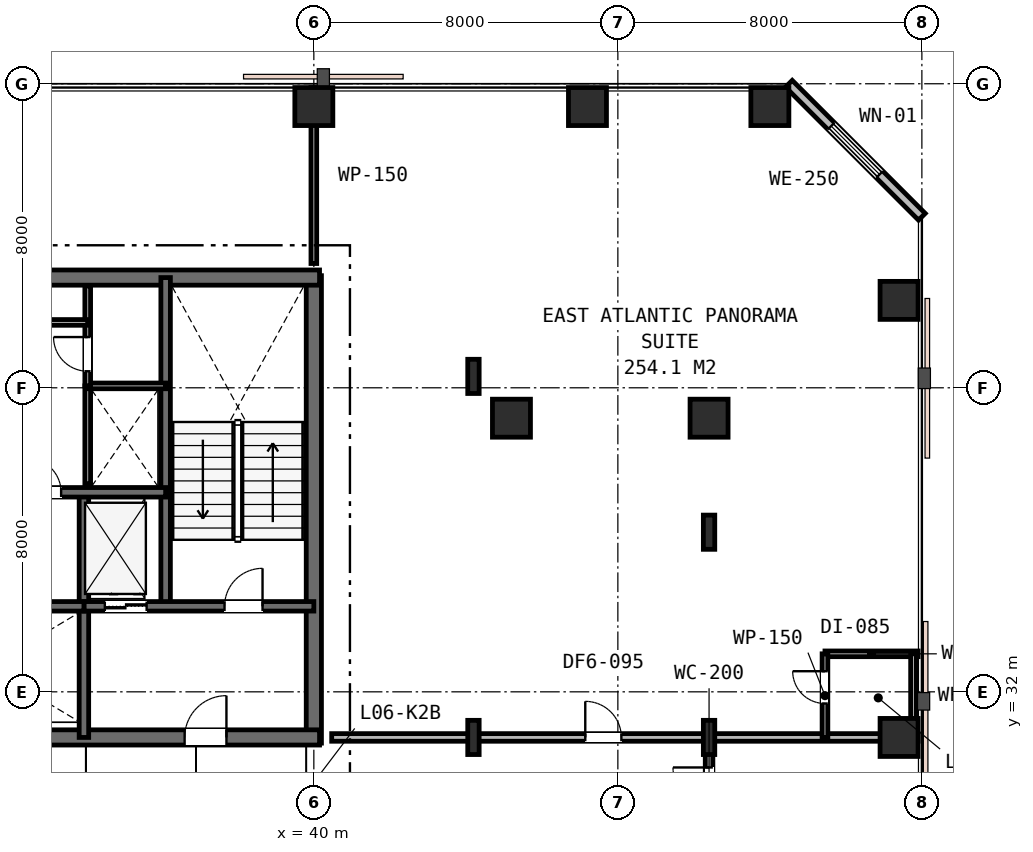
"""IFC4 building model, lengths in metres.
Left out: names, types, materials, properties, quantities, classifications, styles, units other than length and angle.
Written with IfcOpenShell. Run it as: python <this file> out.ifc"""

import sys

from ifc_helpers import new_model, si_unit, direction, frame, frame_2d, origin, origin_2d, place, context, subcontext, project, spatial, rectangle, i_section, extrude, element, fill, save


model = new_model("IFC4")
c1 = context("Model", 3, precision=1e-05, world=origin(), true_north=direction((0.0, 1.0)))
c2 = subcontext(c1, "Body", "Model", "MODEL_VIEW")
j1 = project(units=[si_unit("LENGTHUNIT", "METRE"), si_unit("PLANEANGLEUNIT", "RADIAN")], contexts=[c1])
p1 = place(None, origin())
s1 = spatial("IfcSite", under=j1, at=p1, CompositionType="ELEMENT")
p2 = place(p1, origin())
s2 = spatial("IfcBuilding", under=s1, at=p2, CompositionType="ELEMENT")
p3 = place(p2, frame((0.0, 0.0, 29.4)))
s3 = spatial("IfcBuildingStorey", under=s2, at=p3, CompositionType="ELEMENT", Elevation=29.4)
p4 = place(p3, frame((40.0, 30.65, 0.0), z_axis=(0.0, 0.0, 1.0), x_axis=(0.0, 1.0, 0.0)))
e1 = element("IfcWall", 1, at=p4, inside=s3, PredefinedType="SHEAR", context=c2, shape_type="SweptSolid", body=[
    extrude(rectangle(XDim=12.3, YDim=0.4, at=frame_2d((6.15, 0.0))), origin(), (0.0, 0.0, 1.0), 3.6),
])
p5 = place(p3, frame((15.85, 42.9, 0.0), z_axis=(0.0, 0.0, 1.0), x_axis=(1.0, 0.0, 0.0)))
e2 = element("IfcWall", 2, at=p5, inside=s3, PredefinedType="SHEAR", context=c2, shape_type="SweptSolid", body=[
    extrude(rectangle(XDim=24.3, YDim=0.4, at=frame_2d((12.15, 0.0))), origin(), (0.0, 0.0, 1.0), 3.6),
])
p6 = place(p3, frame((28.95, 30.8, 0.0), z_axis=(0.0, 0.0, 1.0), x_axis=(1.0, 0.0, 0.0)))
e3 = element("IfcWall", 3, at=p6, inside=s3, PredefinedType="SHEAR", context=c2, shape_type="SweptSolid", body=[
    extrude(rectangle(XDim=11.2, YDim=0.4, at=frame_2d((5.6, 0.0))), origin(), (0.0, 0.0, 1.0), 3.6),
])
p7 = place(p6, frame((7.65, 0.0, 0.0)))
e4 = element("IfcOpeningElement", 4, at=p7, cuts=e3, PredefinedType="OPENING", context=c2, shape_type="SweptSolid", body=[
    extrude(rectangle(XDim=1.1, YDim=2.15, at=frame_2d((0.55, 1.075))), frame((0.0, 0.21, 0.0), z_axis=(0.0, -1.0, 0.0), x_axis=(1.0, 0.0, 0.0)), (0.0, 0.0, 1.0), 0.42),
])
p8 = place(p3, frame((36.1, 34.25, 0.0), z_axis=(0.0, 0.0, 1.0), x_axis=(0.0, 1.0, 0.0)))
e5 = element("IfcWall", 5, at=p8, inside=s3, PredefinedType="SHEAR", context=c2, shape_type="SweptSolid", body=[
    extrude(rectangle(XDim=8.65, YDim=0.25, at=frame_2d((4.325, 0.0))), origin(), (0.0, 0.0, 1.0), 3.6),
])
p9 = place(p3, frame((33.95, 30.8, 0.0), z_axis=(0.0, 0.0, 1.0), x_axis=(0.0, 1.0, 0.0)))
e6 = element("IfcWall", 6, at=p9, inside=s3, PredefinedType="SHEAR", context=c2, shape_type="SweptSolid", body=[
    extrude(rectangle(XDim=6.45, YDim=0.25, at=frame_2d((3.225, 0.0))), origin(), (0.0, 0.0, 1.0), 3.6),
])
p10 = place(p3, frame((33.95, 34.25, 0.0), z_axis=(0.0, 0.0, 1.0), x_axis=(1.0, 0.0, 0.0)))
e7 = element("IfcWall", 7, at=p10, inside=s3, PredefinedType="SHEAR", context=c2, shape_type="SweptSolid", body=[
    extrude(rectangle(XDim=6.05, YDim=0.25, at=frame_2d((3.025, 0.0))), origin(), (0.0, 0.0, 1.0), 3.6),
])
p11 = place(p10, frame((3.7, 0.0, 0.0)))
e8 = element("IfcOpeningElement", 8, at=p11, cuts=e7, PredefinedType="OPENING", context=c2, shape_type="SweptSolid", body=[
    extrude(rectangle(XDim=1.0, YDim=2.15, at=frame_2d((0.5, 1.075))), frame((0.0, 0.135, 0.0), z_axis=(0.0, -1.0, 0.0), x_axis=(1.0, 0.0, 0.0)), (0.0, 0.0, 1.0), 0.27),
])
p12 = place(p10, frame((0.55, 0.0, 0.0)))
e9 = element("IfcOpeningElement", 9, at=p12, cuts=e7, PredefinedType="OPENING", context=c2, shape_type="SweptSolid", body=[
    extrude(rectangle(XDim=1.1, YDim=2.15, at=frame_2d((0.55, 1.075))), frame((0.0, 0.135, 0.0), z_axis=(0.0, -1.0, 0.0), x_axis=(1.0, 0.0, 0.0)), (0.0, 0.0, 1.0), 0.27),
])
p13 = place(p3, frame((28.95, 34.25, 0.0), z_axis=(0.0, 0.0, 1.0), x_axis=(1.0, 0.0, 0.0)))
e10 = element("IfcWall", 10, at=p13, inside=s3, PredefinedType="SHEAR", context=c2, shape_type="SweptSolid", body=[
    extrude(rectangle(XDim=5.0, YDim=0.25, at=frame_2d((2.5, 0.0))), origin(), (0.0, 0.0, 1.0), 3.6),
])
p14 = place(p3, frame((19.9, 37.25, 0.0), z_axis=(0.0, 0.0, 1.0), x_axis=(1.0, 0.0, 0.0)))
e11 = element("IfcWall", 11, at=p14, inside=s3, PredefinedType="SHEAR", context=c2, shape_type="SweptSolid", body=[
    extrude(rectangle(XDim=16.2, YDim=0.25, at=frame_2d((8.1, 0.0))), origin(), (0.0, 0.0, 1.0), 3.6),
])
p15 = place(p14, frame((12.55, 0.0, 0.0)))
e12 = element("IfcOpeningElement", 12, at=p15, cuts=e11, PredefinedType="OPENING", context=c2, shape_type="SweptSolid", body=[
    extrude(rectangle(XDim=0.9, YDim=2.15, at=frame_2d((0.45, 1.075))), frame((0.0, 0.135, 0.0), z_axis=(0.0, -1.0, 0.0), x_axis=(1.0, 0.0, 0.0)), (0.0, 0.0, 1.0), 0.27),
])
for number, where, z_axis, x_axis in (
    (13, (45.2, 39.2, 0.0), (0.0, 0.0, 1.0), (1.0, 0.0, 0.0)),
    (14, (40.0, 47.4, 0.0), (0.0, 0.0, 1.0), (1.0, 0.0, 0.0)),
    (15, (47.2, 47.4, 0.0), (0.0, 0.0, 1.0), (1.0, 0.0, 0.0)),
    (16, (50.4, 39.2, 0.0), (0.0, 0.0, 1.0), (1.0, 0.0, 0.0)),
    (17, (55.4, 30.8, 0.0), (0.0, 0.0, 1.0), (1.0, 0.0, 0.0)),
    (18, (55.4, 42.3, 0.0), (0.0, 0.0, 1.0), (1.0, 0.0, 0.0)),
    (19, (52.0, 47.4, 0.0), (0.0, 0.0, 1.0), (1.0, 0.0, 0.0)),
):
    element("IfcColumn", number, at=place(p3, frame(where, z_axis=z_axis, x_axis=x_axis)), inside=s3, PredefinedType="COLUMN", context=c2, shape_type="SweptSolid", body=[
        extrude(rectangle(XDim=1.0, YDim=1.0, at=origin_2d()), origin(), (0.0, 0.0, 1.0), 3.6),
    ])
for number, where, z_axis, x_axis in (
    (20, (44.2, 30.8, 0.0), (0.0, 0.0, 1.0), (1.0, 0.0, 0.0)),
    (21, (44.2, 40.3, 0.0), (0.0, 0.0, 1.0), (1.0, 0.0, 0.0)),
    (22, (50.4, 30.8, 0.0), (0.0, 0.0, 1.0), (1.0, 0.0, 0.0)),
    (23, (50.4, 36.2, 0.0), (0.0, 0.0, 1.0), (1.0, 0.0, 0.0)),
):
    element("IfcColumn", number, at=place(p3, frame(where, z_axis=z_axis, x_axis=x_axis)), inside=s3, PredefinedType="COLUMN", context=c2, shape_type="SweptSolid", body=[
        extrude(i_section(OverallWidth=0.3, OverallDepth=0.9, WebThickness=0.018, FlangeThickness=0.035, FilletRadius=0.03, at=origin_2d()), origin(), (0.0, 0.0, 1.0), 3.6),
    ])
p16 = place(p3, frame((56.0, 44.5, 0.0), z_axis=(0.0, 0.0, 1.0), x_axis=(-0.707106781187, 0.707106781187, 0.0)))
e24 = element("IfcWall", 24, at=p16, inside=s3, PredefinedType="STANDARD", context=c2, shape_type="SweptSolid", body=[
    extrude(rectangle(XDim=4.95, YDim=0.25, at=frame_2d((2.475, 0.0))), origin(), (0.0, 0.0, 1.0), 3.33),
])
p17 = place(p16, frame((1.575, 0.0, 0.75)))
e25 = element("IfcOpeningElement", 25, at=p17, cuts=e24, PredefinedType="OPENING", context=c2, shape_type="SweptSolid", body=[
    extrude(rectangle(XDim=1.8, YDim=1.85, at=frame_2d((0.9, 0.925))), frame((0.0, 0.135, 0.0), z_axis=(0.0, -1.0, 0.0), x_axis=(1.0, 0.0, 0.0)), (0.0, 0.0, 1.0), 0.27),
])
p18 = place(p3, frame((34.05, 37.473, 0.0), z_axis=(0.0, 0.0, 1.0), x_axis=(0.0, 1.0, 0.0)))
e26 = element("IfcWall", 26, at=p18, inside=s3, PredefinedType="PLUMBINGWALL", context=c2, shape_type="SweptSolid", body=[
    extrude(rectangle(XDim=2.577, YDim=0.15, at=frame_2d((1.288, 0.0))), origin(), (0.0, 0.0, 1.0), 3.33),
])
p19 = place(p3, frame((34.05, 40.05, 0.0), z_axis=(0.0, 0.0, 1.0), x_axis=(1.0, 0.0, 0.0)))
e27 = element("IfcWall", 27, at=p19, inside=s3, PredefinedType="PARTITIONING", context=c2, shape_type="SweptSolid", body=[
    extrude(rectangle(XDim=2.05, YDim=0.15, at=frame_2d((1.025, 0.0))), origin(), (0.0, 0.0, 1.0), 3.33),
])
p20 = place(p3, frame((34.05, 40.05, 0.0), z_axis=(0.0, 0.0, 1.0), x_axis=(0.0, 1.0, 0.0)))
e28 = element("IfcWall", 28, at=p20, inside=s3, PredefinedType="PARTITIONING", context=c2, shape_type="SweptSolid", body=[
    extrude(rectangle(XDim=2.63, YDim=0.15, at=frame_2d((1.315, 0.0))), origin(), (0.0, 0.0, 1.0), 3.33),
])
p21 = place(p20, frame((0.385, 0.0, 0.0)))
e29 = element("IfcOpeningElement", 29, at=p21, cuts=e28, PredefinedType="OPENING", context=c2, shape_type="SweptSolid", body=[
    extrude(rectangle(XDim=0.9, YDim=2.15, at=frame_2d((0.45, 1.075))), frame((0.0, 0.085, 0.0), z_axis=(0.0, -1.0, 0.0), x_axis=(1.0, 0.0, 0.0)), (0.0, 0.0, 1.0), 0.17),
])
p22 = place(p3, frame((22.08, 41.72, 0.0), z_axis=(0.0, 0.0, 1.0), x_axis=(1.0, 0.0, 0.0)))
e30 = element("IfcWall", 30, at=p22, inside=s3, PredefinedType="PARTITIONING", context=c2, shape_type="SweptSolid", body=[
    extrude(rectangle(XDim=11.97, YDim=0.15, at=frame_2d((5.985, 0.0))), origin(), (0.0, 0.0, 1.0), 3.33),
])
p23 = place(p22, frame((5.535, 0.0, 0.0)))
e31 = element("IfcOpeningElement", 31, at=p23, cuts=e30, PredefinedType="OPENING", context=c2, shape_type="SweptSolid", body=[
    extrude(rectangle(XDim=0.9, YDim=2.15, at=frame_2d((0.45, 1.075))), frame((0.0, 0.085, 0.0), z_axis=(0.0, -1.0, 0.0), x_axis=(1.0, 0.0, 0.0)), (0.0, 0.0, 1.0), 0.17),
])
p24 = place(p3, frame((40.0, 43.27, 0.0), z_axis=(0.0, 0.0, 1.0), x_axis=(0.0, 1.0, 0.0)))
e32 = element("IfcWall", 32, at=p24, inside=s3, PredefinedType="PARTITIONING", context=c2, shape_type="SweptSolid", body=[
    extrude(rectangle(XDim=4.63, YDim=0.15, at=frame_2d((2.315, 0.0))), origin(), (0.0, 0.0, 1.0), 2.87),
])
p25 = place(p3, frame((40.47, 30.8, 0.0), z_axis=(0.0, 0.0, 1.0), x_axis=(1.0, 0.0, 0.0)))
e33 = element("IfcWall", 33, at=p25, inside=s3, PredefinedType="PARTITIONING", context=c2, shape_type="SweptSolid", body=[
    extrude(rectangle(XDim=15.43, YDim=0.2, at=frame_2d((7.715, 0.0))), origin(), (0.0, 0.0, 1.0), 2.68),
])
p26 = place(p25, frame((6.673, 0.0, 0.0)))
e34 = element("IfcOpeningElement", 34, at=p26, cuts=e33, PredefinedType="OPENING", context=c2, shape_type="SweptSolid", body=[
    extrude(rectangle(XDim=0.95, YDim=2.15, at=frame_2d((0.475, 1.075))), frame((0.0, 0.11, 0.0), z_axis=(0.0, -1.0, 0.0), x_axis=(1.0, 0.0, 0.0)), (0.0, 0.0, 1.0), 0.22),
])
p27 = place(p3, frame((53.45, 33.0, 0.0), z_axis=(0.0, 0.0, 1.0), x_axis=(1.0, 0.0, 0.0)))
e35 = element("IfcWall", 35, at=p27, inside=s3, PredefinedType="PARTITIONING", context=c2, shape_type="SweptSolid", body=[
    extrude(rectangle(XDim=2.45, YDim=0.15, at=frame_2d((1.225, 0.0))), origin(), (0.0, 0.0, 1.0), 2.87),
])
p28 = place(p3, frame((53.45, 30.8, 0.0), z_axis=(0.0, 0.0, 1.0), x_axis=(0.0, 1.0, 0.0)))
e36 = element("IfcWall", 36, at=p28, inside=s3, PredefinedType="PARTITIONING", context=c2, shape_type="SweptSolid", body=[
    extrude(rectangle(XDim=2.2, YDim=0.15, at=frame_2d((1.1, 0.0))), origin(), (0.0, 0.0, 1.0), 2.68),
])
p29 = place(p28, frame((0.892, 0.0, 0.0)))
e37 = element("IfcOpeningElement", 37, at=p29, cuts=e36, PredefinedType="OPENING", context=c2, shape_type="SweptSolid", body=[
    extrude(rectangle(XDim=0.85, YDim=2.15, at=frame_2d((0.425, 1.075))), frame((0.0, 0.085, 0.0), z_axis=(0.0, -1.0, 0.0), x_axis=(1.0, 0.0, 0.0)), (0.0, 0.0, 1.0), 0.17),
])
p30 = place(p3, frame((55.78, 33.0, 0.0), z_axis=(0.0, 0.0, 1.0), x_axis=(0.0, -1.0, 0.0)))
e38 = element("IfcWall", 38, at=p30, inside=s3, PredefinedType="PARTITIONING", context=c2, shape_type="SweptSolid", body=[
    extrude(rectangle(XDim=2.2, YDim=0.15, at=frame_2d((1.1, 0.0))), origin(), (0.0, 0.0, 1.0), 2.68),
])
p31 = place(p3, frame((50.4, 28.6, 0.0), z_axis=(0.0, 0.0, 1.0), x_axis=(0.0, 1.0, 0.0)))
e39 = element("IfcWall", 39, at=p31, inside=s3, PredefinedType="PARTITIONING", context=c2, shape_type="SweptSolid", body=[
    extrude(rectangle(XDim=2.2, YDim=0.2, at=frame_2d((1.1, 0.0))), origin(), (0.0, 0.0, 1.0), 2.68),
])
p32 = place(p31, frame((0.46, 0.0, 0.0)))
e40 = element("IfcOpeningElement", 40, at=p32, cuts=e39, PredefinedType="OPENING", context=c2, shape_type="SweptSolid", body=[
    extrude(rectangle(XDim=0.95, YDim=2.15, at=frame_2d((0.475, 1.075))), frame((0.0, 0.11, 0.0), z_axis=(0.0, -1.0, 0.0), x_axis=(1.0, 0.0, 0.0)), (0.0, 0.0, 1.0), 0.22),
])
p33 = place(p17, origin())
e41 = element("IfcWindow", 41, at=p33, inside=s3, PartitioningType="SINGLE_PANEL", PredefinedType="WINDOW", context=c2, shape_type="SweptSolid", body=[
    extrude(rectangle(XDim=1.8, YDim=1.85, at=frame_2d((0.9, 0.925))), frame((0.0, 0.03, 0.0), z_axis=(0.0, -1.0, 0.0), x_axis=(1.0, 0.0, 0.0)), (0.0, 0.0, 1.0), 0.06),
])
fill(e25, e41)
p34 = place(p11, origin())
e42 = element("IfcDoor", 42, at=p34, inside=s3, OperationType="SINGLE_SWING_RIGHT", PredefinedType="DOOR", context=c2, shape_type="SweptSolid", body=[
    extrude(rectangle(XDim=1.0, YDim=2.15, at=frame_2d((0.5, 1.075))), frame((0.0, 0.025, 0.0), z_axis=(0.0, -1.0, 0.0), x_axis=(1.0, 0.0, 0.0)), (0.0, 0.0, 1.0), 0.05),
])
fill(e8, e42)
p35 = place(p7, origin())
e43 = element("IfcDoor", 43, at=p35, inside=s3, OperationType="SINGLE_SWING_RIGHT", PredefinedType="DOOR", context=c2, shape_type="SweptSolid", body=[
    extrude(rectangle(XDim=1.1, YDim=2.15, at=frame_2d((0.55, 1.075))), frame((0.0, 0.025, 0.0), z_axis=(0.0, -1.0, 0.0), x_axis=(1.0, 0.0, 0.0)), (0.0, 0.0, 1.0), 0.05),
])
fill(e4, e43)
p36 = place(p15, origin())
e44 = element("IfcDoor", 44, at=p36, inside=s3, OperationType="SINGLE_SWING_LEFT", PredefinedType="DOOR", context=c2, shape_type="SweptSolid", body=[
    extrude(rectangle(XDim=0.9, YDim=2.15, at=frame_2d((0.45, 1.075))), frame((0.0, 0.025, 0.0), z_axis=(0.0, -1.0, 0.0), x_axis=(1.0, 0.0, 0.0)), (0.0, 0.0, 1.0), 0.05),
])
fill(e12, e44)
p37 = place(p21, origin())
e45 = element("IfcDoor", 45, at=p37, inside=s3, OperationType="SINGLE_SWING_RIGHT", PredefinedType="DOOR", context=c2, shape_type="SweptSolid", body=[
    extrude(rectangle(XDim=0.9, YDim=2.15, at=frame_2d((0.45, 1.075))), frame((0.0, 0.025, 0.0), z_axis=(0.0, -1.0, 0.0), x_axis=(1.0, 0.0, 0.0)), (0.0, 0.0, 1.0), 0.05),
])
fill(e29, e45)
p38 = place(p26, origin())
e46 = element("IfcDoor", 46, at=p38, inside=s3, OperationType="SINGLE_SWING_LEFT", PredefinedType="DOOR", context=c2, shape_type="SweptSolid", body=[
    extrude(rectangle(XDim=0.95, YDim=2.15, at=frame_2d((0.475, 1.075))), frame((0.0, 0.025, 0.0), z_axis=(0.0, -1.0, 0.0), x_axis=(1.0, 0.0, 0.0)), (0.0, 0.0, 1.0), 0.05),
])
fill(e34, e46)
p39 = place(p29, origin())
e47 = element("IfcDoor", 47, at=p39, inside=s3, OperationType="SINGLE_SWING_RIGHT", PredefinedType="DOOR", context=c2, shape_type="SweptSolid", body=[
    extrude(rectangle(XDim=0.85, YDim=2.15, at=frame_2d((0.425, 1.075))), frame((0.0, 0.025, 0.0), z_axis=(0.0, -1.0, 0.0), x_axis=(1.0, 0.0, 0.0)), (0.0, 0.0, 1.0), 0.05),
])
fill(e37, e47)
p40 = place(p32, origin())
e48 = element("IfcDoor", 48, at=p40, inside=s3, OperationType="SINGLE_SWING_RIGHT", PredefinedType="DOOR", context=c2, shape_type="SweptSolid", body=[
    extrude(rectangle(XDim=0.95, YDim=2.15, at=frame_2d((0.475, 1.075))), frame((0.0, 0.025, 0.0), z_axis=(0.0, -1.0, 0.0), x_axis=(1.0, 0.0, 0.0)), (0.0, 0.0, 1.0), 0.05),
])
fill(e40, e48)
p41 = place(p12, origin())
e49 = element("IfcDoor", 49, at=p41, inside=s3, OperationType="DOUBLE_DOOR_SLIDING", PredefinedType="DOOR", context=c2, shape_type="SweptSolid", body=[
    extrude(rectangle(XDim=1.1, YDim=2.15, at=frame_2d((0.55, 1.075))), frame((0.0, 0.025, 0.0), z_axis=(0.0, -1.0, 0.0), x_axis=(1.0, 0.0, 0.0)), (0.0, 0.0, 1.0), 0.05),
])
fill(e9, e49)
save(model, sys.argv[1])
